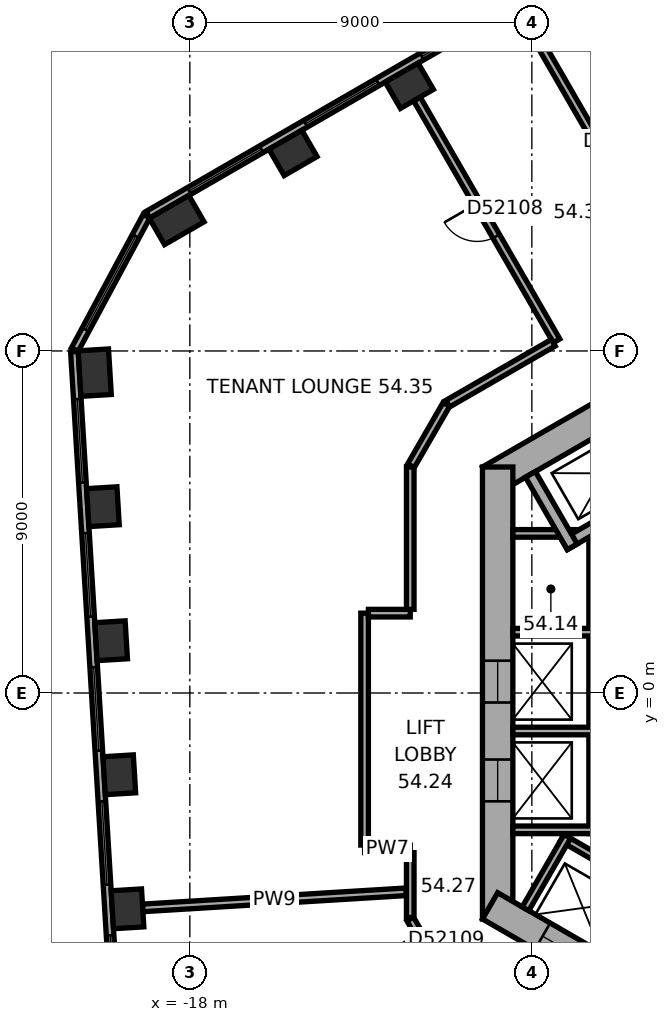
"""IFC4 building model, lengths in metres.
Left out: names, types, materials, properties, quantities, classifications, styles, units other than length and angle.
Written with IfcOpenShell. Run it as: python <this file> out.ifc"""

import sys

from ifc_helpers import new_model, si_unit, direction, frame, frame_2d, origin, origin_2d, place, context, subcontext, project, spatial, rectangle, extrude, element, fill, save


model = new_model("IFC4")
c1 = context("Model", 3, precision=1e-05, world=origin(), true_north=direction((0.0, 1.0)))
c2 = subcontext(c1, "Body", "Model", "MODEL_VIEW")
j1 = project(units=[si_unit("LENGTHUNIT", "METRE"), si_unit("PLANEANGLEUNIT", "RADIAN")], contexts=[c1])
p1 = place(None, origin())
s1 = spatial("IfcSite", under=j1, at=p1, CompositionType="ELEMENT")
p2 = place(p1, origin())
s2 = spatial("IfcBuilding", under=s1, at=p2, CompositionType="ELEMENT")
p3 = place(p2, frame((0.0, 0.0, 221.7)))
s3 = spatial("IfcBuildingStorey", under=s2, at=p3, CompositionType="ELEMENT", Elevation=221.7)
for number, where, z_axis, x_axis in (
    (1, (-12.225, 15.978, 0.0), (0.0, 0.0, 1.0), (-0.866, -0.5, 0.0)),
    (2, (-15.285, 14.211, 0.0), (0.0, 0.0, 1.0), (-0.866, -0.5, 0.0)),
):
    element("IfcColumn", number, at=place(p3, frame(where, z_axis=z_axis, x_axis=x_axis)), inside=s3, PredefinedType="COLUMN", context=c2, shape_type="SweptSolid", body=[
        extrude(rectangle(XDim=1.0, YDim=0.8, at=origin_2d()), origin(), (0.0, 0.0, 1.0), 3.7),
    ])
for number, where, z_axis, x_axis in (
    (3, (-18.345, 12.445, 0.0), (0.0, 0.0, 1.0), (-0.866, -0.5, 0.0)),
    (4, (-20.503, 8.429, 0.0), (0.0, 0.0, 1.0), (0.061, -0.998, 0.0)),
):
    element("IfcColumn", number, at=place(p3, frame(where, z_axis=z_axis, x_axis=x_axis)), inside=s3, PredefinedType="COLUMN", context=c2, shape_type="SweptSolid", body=[
        extrude(rectangle(XDim=1.2, YDim=0.8, at=origin_2d()), origin(), (0.0, 0.0, 1.0), 3.7),
    ])
for number, where, z_axis, x_axis in (
    (5, (-20.287, 4.902, 0.0), (0.0, 0.0, 1.0), (0.061, -0.998, 0.0)),
    (6, (-20.071, 1.375, 0.0), (0.0, 0.0, 1.0), (0.061, -0.998, 0.0)),
    (7, (-19.856, -2.152, 0.0), (0.0, 0.0, 1.0), (0.061, -0.998, 0.0)),
    (8, (-19.64, -5.679, 0.0), (0.0, 0.0, 1.0), (0.061, -0.998, 0.0)),
):
    element("IfcColumn", number, at=place(p3, frame(where, z_axis=z_axis, x_axis=x_axis)), inside=s3, PredefinedType="COLUMN", context=c2, shape_type="SweptSolid", body=[
        extrude(rectangle(XDim=1.0, YDim=0.8, at=origin_2d()), origin(), (0.0, 0.0, 1.0), 3.7),
    ])
p4 = place(p3, frame((0.2, 11.547, 0.0), z_axis=(0.0, 0.0, 1.0), x_axis=(-0.866023897231, -0.500002609418, 0.0)))
e9 = element("IfcWall", 9, at=p4, inside=s3, PredefinedType="SHEAR", context=c2, shape_type="SweptSolid", body=[
    extrude(rectangle(XDim=11.894, YDim=0.8, at=frame_2d((5.947, 0.0))), origin(), (0.0, 0.0, 1.0), 3.7),
])
p5 = place(p4, frame((6.147, 0.0, 0.0)))
e10 = element("IfcOpeningElement", 10, at=p5, cuts=e9, PredefinedType="OPENING", context=c2, shape_type="SweptSolid", body=[
    extrude(rectangle(XDim=1.5, YDim=2.1, at=frame_2d((0.75, 1.05))), frame((0.0, 0.41, 0.0), z_axis=(0.0, -1.0, 0.0), x_axis=(1.0, 0.0, 0.0)), (0.0, 0.0, 1.0), 0.82),
])
p6 = place(p4, frame((2.997, 0.0, 0.0)))
e11 = element("IfcOpeningElement", 11, at=p6, cuts=e9, PredefinedType="OPENING", context=c2, shape_type="SweptSolid", body=[
    extrude(rectangle(XDim=0.9, YDim=2.1, at=frame_2d((0.45, 1.05))), frame((0.0, 0.41, 0.0), z_axis=(0.0, -1.0, 0.0), x_axis=(1.0, 0.0, 0.0)), (0.0, 0.0, 1.0), 0.82),
])
p7 = place(p3, frame((-9.9, 5.947, 0.0), z_axis=(0.0, 0.0, 1.0), x_axis=(0.0, -1.0, 0.0)))
e12 = element("IfcWall", 12, at=p7, inside=s3, PredefinedType="SHEAR", context=c2, shape_type="SweptSolid", body=[
    extrude(rectangle(XDim=11.894, YDim=0.8, at=frame_2d((5.947, 0.0))), origin(), (0.0, 0.0, 1.0), 3.7),
])
p8 = place(p7, frame((5.097, 0.0, 0.0)))
e13 = element("IfcOpeningElement", 13, at=p8, cuts=e12, PredefinedType="OPENING", context=c2, shape_type="SweptSolid", body=[
    extrude(rectangle(XDim=1.1, YDim=2.1, at=frame_2d((0.55, 1.05))), frame((0.0, 0.41, 0.0), z_axis=(0.0, -1.0, 0.0), x_axis=(1.0, 0.0, 0.0)), (0.0, 0.0, 1.0), 0.82),
])
p9 = place(p7, frame((7.697, 0.0, 0.0)))
e14 = element("IfcOpeningElement", 14, at=p9, cuts=e12, PredefinedType="OPENING", context=c2, shape_type="SweptSolid", body=[
    extrude(rectangle(XDim=1.1, YDim=2.1, at=frame_2d((0.55, 1.05))), frame((0.0, 0.41, 0.0), z_axis=(0.0, -1.0, 0.0), x_axis=(1.0, 0.0, 0.0)), (0.0, 0.0, 1.0), 0.82),
])
p10 = place(p3, frame((-10.1, -5.6, 0.0), z_axis=(0.0, 0.0, 1.0), x_axis=(0.866023897231, -0.500002609418, 0.0)))
e15 = element("IfcWall", 15, at=p10, inside=s3, PredefinedType="SHEAR", context=c2, shape_type="SweptSolid", body=[
    extrude(rectangle(XDim=11.894, YDim=0.8, at=frame_2d((5.947, 0.0))), origin(), (0.0, 0.0, 1.0), 3.7),
])
p11 = place(p10, frame((6.147, 0.0, 0.0)))
e16 = element("IfcOpeningElement", 16, at=p11, cuts=e15, PredefinedType="OPENING", context=c2, shape_type="SweptSolid", body=[
    extrude(rectangle(XDim=1.5, YDim=2.1, at=frame_2d((0.75, 1.05))), frame((0.0, 0.41, 0.0), z_axis=(0.0, -1.0, 0.0), x_axis=(1.0, 0.0, 0.0)), (0.0, 0.0, 1.0), 0.82),
])
p12 = place(p10, frame((1.597, 0.0, 0.0)))
e17 = element("IfcOpeningElement", 17, at=p12, cuts=e15, PredefinedType="OPENING", context=c2, shape_type="SweptSolid", body=[
    extrude(rectangle(XDim=1.1, YDim=2.1, at=frame_2d((0.55, 1.05))), frame((0.0, 0.41, 0.0), z_axis=(0.0, -1.0, 0.0), x_axis=(1.0, 0.0, 0.0)), (0.0, 0.0, 1.0), 0.82),
])
p13 = place(p10, frame((4.197, 0.0, 0.0)))
e18 = element("IfcOpeningElement", 18, at=p13, cuts=e15, PredefinedType="OPENING", context=c2, shape_type="SweptSolid", body=[
    extrude(rectangle(XDim=1.1, YDim=2.1, at=frame_2d((0.55, 1.05))), frame((0.0, 0.41, 0.0), z_axis=(0.0, -1.0, 0.0), x_axis=(1.0, 0.0, 0.0)), (0.0, 0.0, 1.0), 0.82),
])
p14 = place(p3, frame((-2.786, 22.005, 0.0), z_axis=(0.0, 0.0, 1.0), x_axis=(-0.866026555358, -0.49999800541, 0.0)))
e19 = element("IfcWall", 19, at=p14, inside=s3, PredefinedType="STANDARD", context=c2, shape_type="SweptSolid", body=[
    extrude(rectangle(XDim=18.841, YDim=0.2, at=frame_2d((9.421, 0.0))), origin(), (0.0, 0.0, 1.0), 3.7),
])
p15 = place(p14, frame((1.254, 0.0, 0.9)))
e20 = element("IfcOpeningElement", 20, at=p15, cuts=e19, PredefinedType="OPENING", context=c2, shape_type="SweptSolid", body=[
    extrude(rectangle(XDim=2.2, YDim=2.0, at=frame_2d((1.1, 1.0))), frame((0.0, 0.11, 0.0), z_axis=(0.0, -1.0, 0.0), x_axis=(1.0, 0.0, 0.0)), (0.0, 0.0, 1.0), 0.22),
])
p16 = place(p14, frame((4.788, 0.0, 0.9)))
e21 = element("IfcOpeningElement", 21, at=p16, cuts=e19, PredefinedType="OPENING", context=c2, shape_type="SweptSolid", body=[
    extrude(rectangle(XDim=2.2, YDim=2.0, at=frame_2d((1.1, 1.0))), frame((0.0, 0.11, 0.0), z_axis=(0.0, -1.0, 0.0), x_axis=(1.0, 0.0, 0.0)), (0.0, 0.0, 1.0), 0.22),
])
p17 = place(p14, frame((8.321, 0.0, 0.9)))
e22 = element("IfcOpeningElement", 22, at=p17, cuts=e19, PredefinedType="OPENING", context=c2, shape_type="SweptSolid", body=[
    extrude(rectangle(XDim=2.2, YDim=2.0, at=frame_2d((1.1, 1.0))), frame((0.0, 0.11, 0.0), z_axis=(0.0, -1.0, 0.0), x_axis=(1.0, 0.0, 0.0)), (0.0, 0.0, 1.0), 0.22),
])
p18 = place(p14, frame((11.855, 0.0, 0.9)))
e23 = element("IfcOpeningElement", 23, at=p18, cuts=e19, PredefinedType="OPENING", context=c2, shape_type="SweptSolid", body=[
    extrude(rectangle(XDim=2.2, YDim=2.0, at=frame_2d((1.1, 1.0))), frame((0.0, 0.11, 0.0), z_axis=(0.0, -1.0, 0.0), x_axis=(1.0, 0.0, 0.0)), (0.0, 0.0, 1.0), 0.22),
])
p19 = place(p14, frame((15.389, 0.0, 0.9)))
e24 = element("IfcOpeningElement", 24, at=p19, cuts=e19, PredefinedType="OPENING", context=c2, shape_type="SweptSolid", body=[
    extrude(rectangle(XDim=2.2, YDim=2.0, at=frame_2d((1.1, 1.0))), frame((0.0, 0.11, 0.0), z_axis=(0.0, -1.0, 0.0), x_axis=(1.0, 0.0, 0.0)), (0.0, 0.0, 1.0), 0.22),
])
p20 = place(p3, frame((-19.141, 12.545, 0.0), z_axis=(0.0, 0.0, 1.0), x_axis=(-0.473306370921, -0.880897882416, 0.0)))
e25 = element("IfcWall", 25, at=p20, inside=s3, PredefinedType="STANDARD", context=c2, shape_type="SweptSolid", body=[
    extrude(rectangle(XDim=3.983, YDim=0.2, at=frame_2d((1.991, 0.0))), origin(), (0.0, 0.0, 1.0), 3.7),
])
p21 = place(p20, frame((0.591, 0.0, 0.9)))
e26 = element("IfcOpeningElement", 26, at=p21, cuts=e25, PredefinedType="OPENING", context=c2, shape_type="SweptSolid", body=[
    extrude(rectangle(XDim=2.8, YDim=2.0, at=frame_2d((1.4, 1.0))), frame((0.0, 0.11, 0.0), z_axis=(0.0, -1.0, 0.0), x_axis=(1.0, 0.0, 0.0)), (0.0, 0.0, 1.0), 0.22),
])
p22 = place(p3, frame((-21.038, 8.984, 0.0), z_axis=(0.0, 0.0, 1.0), x_axis=(0.061043935634, -0.998135079998, 0.0)))
e27 = element("IfcWall", 27, at=p22, inside=s3, PredefinedType="STANDARD", context=c2, shape_type="SweptSolid", body=[
    extrude(rectangle(XDim=18.841, YDim=0.2, at=frame_2d((9.421, 0.0))), origin(), (0.0, 0.0, 1.0), 3.7),
])
p23 = place(p22, frame((1.253, 0.0, 0.9)))
e28 = element("IfcOpeningElement", 28, at=p23, cuts=e27, PredefinedType="OPENING", context=c2, shape_type="SweptSolid", body=[
    extrude(rectangle(XDim=2.2, YDim=2.0, at=frame_2d((1.1, 1.0))), frame((0.0, 0.11, 0.0), z_axis=(0.0, -1.0, 0.0), x_axis=(1.0, 0.0, 0.0)), (0.0, 0.0, 1.0), 0.22),
])
p24 = place(p22, frame((4.786, 0.0, 0.9)))
e29 = element("IfcOpeningElement", 29, at=p24, cuts=e27, PredefinedType="OPENING", context=c2, shape_type="SweptSolid", body=[
    extrude(rectangle(XDim=2.2, YDim=2.0, at=frame_2d((1.1, 1.0))), frame((0.0, 0.11, 0.0), z_axis=(0.0, -1.0, 0.0), x_axis=(1.0, 0.0, 0.0)), (0.0, 0.0, 1.0), 0.22),
])
p25 = place(p22, frame((8.32, 0.0, 0.9)))
e30 = element("IfcOpeningElement", 30, at=p25, cuts=e27, PredefinedType="OPENING", context=c2, shape_type="SweptSolid", body=[
    extrude(rectangle(XDim=2.2, YDim=2.0, at=frame_2d((1.1, 1.0))), frame((0.0, 0.11, 0.0), z_axis=(0.0, -1.0, 0.0), x_axis=(1.0, 0.0, 0.0)), (0.0, 0.0, 1.0), 0.22),
])
p26 = place(p22, frame((11.854, 0.0, 0.9)))
e31 = element("IfcOpeningElement", 31, at=p26, cuts=e27, PredefinedType="OPENING", context=c2, shape_type="SweptSolid", body=[
    extrude(rectangle(XDim=2.2, YDim=2.0, at=frame_2d((1.1, 1.0))), frame((0.0, 0.11, 0.0), z_axis=(0.0, -1.0, 0.0), x_axis=(1.0, 0.0, 0.0)), (0.0, 0.0, 1.0), 0.22),
])
p27 = place(p22, frame((15.387, 0.0, 0.9)))
e32 = element("IfcOpeningElement", 32, at=p27, cuts=e27, PredefinedType="OPENING", context=c2, shape_type="SweptSolid", body=[
    extrude(rectangle(XDim=2.2, YDim=2.0, at=frame_2d((1.1, 1.0))), frame((0.0, 0.11, 0.0), z_axis=(0.0, -1.0, 0.0), x_axis=(1.0, 0.0, 0.0)), (0.0, 0.0, 1.0), 0.22),
])
p28 = place(p3, frame((-7.4, 4.3, 0.0), z_axis=(0.0, 0.0, 1.0), x_axis=(0.0, -1.0, 0.0)))
e33 = element("IfcWall", 33, at=p28, inside=s3, PredefinedType="PARTITIONING", context=c2, shape_type="SweptSolid", body=[
    extrude(rectangle(XDim=8.0, YDim=0.2, at=frame_2d((4.0, 0.0))), origin(), (0.0, 0.0, 1.0), 3.42),
])
for number, where, z_axis, x_axis in (
    (34, (-7.3, 4.2, 0.0), (0.0, 0.0, 1.0), (-1.0, 0.0, 0.0)),
    (35, (-7.3, 1.6, 0.0), (0.0, 0.0, 1.0), (-1.0, 0.0, 0.0)),
    (36, (-7.3, -1.0, 0.0), (0.0, 0.0, 1.0), (-1.0, 0.0, 0.0)),
    (37, (-7.3, -3.6, 0.0), (0.0, 0.0, 1.0), (-1.0, 0.0, 0.0)),
):
    element("IfcWall", number, at=place(p3, frame(where, z_axis=z_axis, x_axis=x_axis)), inside=s3, PredefinedType="PARTITIONING", context=c2, shape_type="SweptSolid", body=[
        extrude(rectangle(XDim=2.2, YDim=0.2, at=frame_2d((1.1, 0.0))), origin(), (0.0, 0.0, 1.0), 3.42),
    ])
p29 = place(p3, frame((-8.203, -3.809, 0.0), z_axis=(0.0, 0.0, 1.0), x_axis=(0.866028230842, -0.499995103361, 0.0)))
e38 = element("IfcWall", 38, at=p29, inside=s3, PredefinedType="PARTITIONING", context=c2, shape_type="SweptSolid", body=[
    extrude(rectangle(XDim=5.4, YDim=0.2, at=frame_2d((2.7, 0.0))), origin(), (0.0, 0.0, 1.0), 3.42),
])
p30 = place(p3, frame((-8.067, -3.772, 0.0), z_axis=(0.0, 0.0, 1.0), x_axis=(-0.50002983664, -0.866008176907, 0.0)))
e39 = element("IfcWall", 39, at=p30, inside=s3, PredefinedType="PARTITIONING", context=c2, shape_type="SweptSolid", body=[
    extrude(rectangle(XDim=2.2, YDim=0.2, at=frame_2d((1.1, 0.0))), origin(), (0.0, 0.0, 1.0), 3.42),
])
p31 = place(p3, frame((-5.24, 5.577, 0.0), z_axis=(0.0, 0.0, 1.0), x_axis=(-0.866014461049, -0.500018952895, 0.0)))
e40 = element("IfcWall", 40, at=p31, inside=s3, PredefinedType="SHEAR", context=c2, shape_type="SweptSolid", body=[
    extrude(rectangle(XDim=3.35, YDim=0.3, at=frame_2d((1.675, 0.0))), origin(), (0.0, 0.0, 1.0), 3.42),
])
p32 = place(p3, frame((-7.937, 3.847, 0.0), z_axis=(0.0, 0.0, 1.0), x_axis=(-0.50002983664, 0.866008176907, 0.0)))
e41 = element("IfcWall", 41, at=p32, inside=s3, PredefinedType="SHEAR", context=c2, shape_type="SweptSolid", body=[
    extrude(rectangle(XDim=2.2, YDim=0.3, at=frame_2d((1.1, 0.0))), origin(), (0.0, 0.0, 1.0), 3.42),
])
p33 = place(p3, frame((-19.241, -5.654, 0.0), z_axis=(0.0, 0.0, 1.0), x_axis=(0.998135538818, 0.061036432963, 0.0)))
e42 = element("IfcWall", 42, at=p33, inside=s3, PredefinedType="PARTITIONING", context=c2, shape_type="SweptSolid", body=[
    extrude(rectangle(XDim=6.944, YDim=0.2, at=frame_2d((3.472, 0.0))), origin(), (0.0, 0.0, 1.0), 2.87),
])
p34 = place(p3, frame((-13.401, -4.101, 0.0), z_axis=(0.0, 0.0, 1.0), x_axis=(1.0, 0.0, 0.0)))
e43 = element("IfcWall", 43, at=p34, inside=s3, PredefinedType="PARTITIONING", context=c2, shape_type="SweptSolid", body=[
    extrude(rectangle(XDim=1.201, YDim=0.2, at=frame_2d((0.601, 0.0))), origin(), (0.0, 0.0, 1.0), 3.42),
])
p35 = place(p3, frame((-13.401, 2.101, 0.0), z_axis=(0.0, 0.0, 1.0), x_axis=(0.0, -1.0, 0.0)))
e44 = element("IfcWall", 44, at=p35, inside=s3, PredefinedType="PARTITIONING", context=c2, shape_type="SweptSolid", body=[
    extrude(rectangle(XDim=6.102, YDim=0.2, at=frame_2d((3.051, 0.0))), origin(), (0.0, 0.0, 1.0), 3.42),
])
p36 = place(p3, frame((-12.2, -5.947, 0.0), z_axis=(0.0, 0.0, 1.0), x_axis=(0.500022797313, -0.86601224135, 0.0)))
e45 = element("IfcWall", 45, at=p36, inside=s3, PredefinedType="PARTITIONING", context=c2, shape_type="SweptSolid", body=[
    extrude(rectangle(XDim=1.9, YDim=0.2, at=frame_2d((0.95, 0.0))), origin(), (0.0, 0.0, 1.0), 3.42),
])
p37 = place(p36, frame((0.45, 0.0, 0.0)))
e46 = element("IfcOpeningElement", 46, at=p37, cuts=e45, PredefinedType="OPENING", context=c2, shape_type="SweptSolid", body=[
    extrude(rectangle(XDim=1.0, YDim=2.1, at=frame_2d((0.5, 1.05))), frame((0.0, 0.11, 0.0), z_axis=(0.0, -1.0, 0.0), x_axis=(1.0, 0.0, 0.0)), (0.0, 0.0, 1.0), 0.22),
])
p38 = place(p3, frame((-12.2, -4.201, 0.0), z_axis=(0.0, 0.0, 1.0), x_axis=(0.0, -1.0, 0.0)))
e47 = element("IfcWall", 47, at=p38, inside=s3, PredefinedType="PARTITIONING", context=c2, shape_type="SweptSolid", body=[
    extrude(rectangle(XDim=1.706, YDim=0.2, at=frame_2d((0.853, 0.0))), origin(), (0.0, 0.0, 1.0), 3.42),
])
p39 = place(p3, frame((-12.2, 2.101, 0.0), z_axis=(0.0, 0.0, 1.0), x_axis=(-1.0, 0.0, 0.0)))
e48 = element("IfcWall", 48, at=p39, inside=s3, PredefinedType="PARTITIONING", context=c2, shape_type="SweptSolid", body=[
    extrude(rectangle(XDim=1.101, YDim=0.2, at=frame_2d((0.551, 0.0))), origin(), (0.0, 0.0, 1.0), 3.42),
])
p40 = place(p3, frame((-12.2, 5.947, 0.0), z_axis=(0.0, 0.0, 1.0), x_axis=(0.0, -1.0, 0.0)))
e49 = element("IfcWall", 49, at=p40, inside=s3, PredefinedType="PARTITIONING", context=c2, shape_type="SweptSolid", body=[
    extrude(rectangle(XDim=3.746, YDim=0.2, at=frame_2d((1.873, 0.0))), origin(), (0.0, 0.0, 1.0), 3.42),
])
p41 = place(p3, frame((-12.025, 15.632, 0.0), z_axis=(0.0, 0.0, 1.0), x_axis=(0.499983153418, -0.866035129944, 0.0)))
e50 = element("IfcWall", 50, at=p41, inside=s3, PredefinedType="PARTITIONING", context=c2, shape_type="SweptSolid", body=[
    extrude(rectangle(XDim=7.35, YDim=0.2, at=frame_2d((3.675, 0.0))), origin(), (0.0, 0.0, 1.0), 3.42),
])
p42 = place(p41, frame((3.175, 0.0, 0.0)))
e51 = element("IfcOpeningElement", 51, at=p42, cuts=e50, PredefinedType="OPENING", context=c2, shape_type="SweptSolid", body=[
    extrude(rectangle(XDim=1.0, YDim=2.1, at=frame_2d((0.5, 1.05))), frame((0.0, 0.11, 0.0), z_axis=(0.0, -1.0, 0.0), x_axis=(1.0, 0.0, 0.0)), (0.0, 0.0, 1.0), 0.22),
])
p43 = place(p3, frame((-11.25, 7.592, 0.0), z_axis=(0.0, 0.0, 1.0), x_axis=(-0.499964847546, -0.866045698112, 0.0)))
e52 = element("IfcWall", 52, at=p43, inside=s3, PredefinedType="PARTITIONING", context=c2, shape_type="SweptSolid", body=[
    extrude(rectangle(XDim=1.86, YDim=0.2, at=frame_2d((0.93, 0.0))), origin(), (0.0, 0.0, 1.0), 3.42),
])
p44 = place(p3, frame((-8.965, 17.399, 0.0), z_axis=(0.0, 0.0, 1.0), x_axis=(0.499993683172, -0.866029050776, 0.0)))
e53 = element("IfcWall", 53, at=p44, inside=s3, PredefinedType="PARTITIONING", context=c2, shape_type="SweptSolid", body=[
    extrude(rectangle(XDim=7.35, YDim=0.2, at=frame_2d((3.675, 0.0))), origin(), (0.0, 0.0, 1.0), 2.87),
])
p45 = place(p44, frame((3.175, 0.0, 0.0)))
e54 = element("IfcOpeningElement", 54, at=p45, cuts=e53, PredefinedType="OPENING", context=c2, shape_type="SweptSolid", body=[
    extrude(rectangle(XDim=1.0, YDim=2.1, at=frame_2d((0.5, 1.05))), frame((0.0, 0.11, 0.0), z_axis=(0.0, -1.0, 0.0), x_axis=(1.0, 0.0, 0.0)), (0.0, 0.0, 1.0), 0.22),
])
p46 = place(p3, frame((-8.437, 9.217, 0.0), z_axis=(0.0, 0.0, 1.0), x_axis=(-0.866005660673, -0.500034194513, 0.0)))
e55 = element("IfcWall", 55, at=p46, inside=s3, PredefinedType="PARTITIONING", context=c2, shape_type="SweptSolid", body=[
    extrude(rectangle(XDim=3.209, YDim=0.2, at=frame_2d((1.604, 0.0))), origin(), (0.0, 0.0, 1.0), 3.42),
])
p47 = place(p17, origin())
e56 = element("IfcWindow", 56, at=p47, inside=s3, PartitioningType="SINGLE_PANEL", PredefinedType="WINDOW", context=c2, shape_type="SweptSolid", body=[
    extrude(rectangle(XDim=2.2, YDim=2.0, at=frame_2d((1.1, 1.0))), frame((0.0, 0.03, 0.0), z_axis=(0.0, -1.0, 0.0), x_axis=(1.0, 0.0, 0.0)), (0.0, 0.0, 1.0), 0.06),
])
fill(e22, e56)
p48 = place(p18, origin())
e57 = element("IfcWindow", 57, at=p48, inside=s3, PartitioningType="SINGLE_PANEL", PredefinedType="WINDOW", context=c2, shape_type="SweptSolid", body=[
    extrude(rectangle(XDim=2.2, YDim=2.0, at=frame_2d((1.1, 1.0))), frame((0.0, 0.03, 0.0), z_axis=(0.0, -1.0, 0.0), x_axis=(1.0, 0.0, 0.0)), (0.0, 0.0, 1.0), 0.06),
])
fill(e23, e57)
p49 = place(p19, origin())
e58 = element("IfcWindow", 58, at=p49, inside=s3, PartitioningType="SINGLE_PANEL", PredefinedType="WINDOW", context=c2, shape_type="SweptSolid", body=[
    extrude(rectangle(XDim=2.2, YDim=2.0, at=frame_2d((1.1, 1.0))), frame((0.0, 0.03, 0.0), z_axis=(0.0, -1.0, 0.0), x_axis=(1.0, 0.0, 0.0)), (0.0, 0.0, 1.0), 0.06),
])
fill(e24, e58)
p50 = place(p21, origin())
e59 = element("IfcWindow", 59, at=p50, inside=s3, PartitioningType="SINGLE_PANEL", PredefinedType="WINDOW", context=c2, shape_type="SweptSolid", body=[
    extrude(rectangle(XDim=2.8, YDim=2.0, at=frame_2d((1.4, 1.0))), frame((0.0, 0.03, 0.0), z_axis=(0.0, -1.0, 0.0), x_axis=(1.0, 0.0, 0.0)), (0.0, 0.0, 1.0), 0.06),
])
fill(e26, e59)
p51 = place(p23, origin())
e60 = element("IfcWindow", 60, at=p51, inside=s3, PartitioningType="SINGLE_PANEL", PredefinedType="WINDOW", context=c2, shape_type="SweptSolid", body=[
    extrude(rectangle(XDim=2.2, YDim=2.0, at=frame_2d((1.1, 1.0))), frame((0.0, 0.03, 0.0), z_axis=(0.0, -1.0, 0.0), x_axis=(1.0, 0.0, 0.0)), (0.0, 0.0, 1.0), 0.06),
])
fill(e28, e60)
p52 = place(p24, origin())
e61 = element("IfcWindow", 61, at=p52, inside=s3, PartitioningType="SINGLE_PANEL", PredefinedType="WINDOW", context=c2, shape_type="SweptSolid", body=[
    extrude(rectangle(XDim=2.2, YDim=2.0, at=frame_2d((1.1, 1.0))), frame((0.0, 0.03, 0.0), z_axis=(0.0, -1.0, 0.0), x_axis=(1.0, 0.0, 0.0)), (0.0, 0.0, 1.0), 0.06),
])
fill(e29, e61)
p53 = place(p25, origin())
e62 = element("IfcWindow", 62, at=p53, inside=s3, PartitioningType="SINGLE_PANEL", PredefinedType="WINDOW", context=c2, shape_type="SweptSolid", body=[
    extrude(rectangle(XDim=2.2, YDim=2.0, at=frame_2d((1.1, 1.0))), frame((0.0, 0.03, 0.0), z_axis=(0.0, -1.0, 0.0), x_axis=(1.0, 0.0, 0.0)), (0.0, 0.0, 1.0), 0.06),
])
fill(e30, e62)
p54 = place(p26, origin())
e63 = element("IfcWindow", 63, at=p54, inside=s3, PartitioningType="SINGLE_PANEL", PredefinedType="WINDOW", context=c2, shape_type="SweptSolid", body=[
    extrude(rectangle(XDim=2.2, YDim=2.0, at=frame_2d((1.1, 1.0))), frame((0.0, 0.03, 0.0), z_axis=(0.0, -1.0, 0.0), x_axis=(1.0, 0.0, 0.0)), (0.0, 0.0, 1.0), 0.06),
])
fill(e31, e63)
p55 = place(p27, origin())
e64 = element("IfcWindow", 64, at=p55, inside=s3, PartitioningType="SINGLE_PANEL", PredefinedType="WINDOW", context=c2, shape_type="SweptSolid", body=[
    extrude(rectangle(XDim=2.2, YDim=2.0, at=frame_2d((1.1, 1.0))), frame((0.0, 0.03, 0.0), z_axis=(0.0, -1.0, 0.0), x_axis=(1.0, 0.0, 0.0)), (0.0, 0.0, 1.0), 0.06),
])
fill(e32, e64)
p56 = place(p8, origin())
e65 = element("IfcDoor", 65, at=p56, inside=s3, OperationType="DOUBLE_DOOR_SLIDING", PredefinedType="DOOR", context=c2, shape_type="SweptSolid", body=[
    extrude(rectangle(XDim=1.1, YDim=2.1, at=frame_2d((0.55, 1.05))), frame((0.0, 0.025, 0.0), z_axis=(0.0, -1.0, 0.0), x_axis=(1.0, 0.0, 0.0)), (0.0, 0.0, 1.0), 0.05),
])
fill(e13, e65)
p57 = place(p9, origin())
e66 = element("IfcDoor", 66, at=p57, inside=s3, OperationType="DOUBLE_DOOR_SLIDING", PredefinedType="DOOR", context=c2, shape_type="SweptSolid", body=[
    extrude(rectangle(XDim=1.1, YDim=2.1, at=frame_2d((0.55, 1.05))), frame((0.0, 0.025, 0.0), z_axis=(0.0, -1.0, 0.0), x_axis=(1.0, 0.0, 0.0)), (0.0, 0.0, 1.0), 0.05),
])
fill(e14, e66)
p58 = place(p12, origin())
e67 = element("IfcDoor", 67, at=p58, inside=s3, OperationType="DOUBLE_DOOR_SLIDING", PredefinedType="DOOR", context=c2, shape_type="SweptSolid", body=[
    extrude(rectangle(XDim=1.1, YDim=2.1, at=frame_2d((0.55, 1.05))), frame((0.0, 0.025, 0.0), z_axis=(0.0, -1.0, 0.0), x_axis=(1.0, 0.0, 0.0)), (0.0, 0.0, 1.0), 0.05),
])
fill(e17, e67)
p59 = place(p42, origin())
e68 = element("IfcDoor", 68, at=p59, inside=s3, OperationType="SINGLE_SWING_LEFT", PredefinedType="DOOR", context=c2, shape_type="SweptSolid", body=[
    extrude(rectangle(XDim=1.0, YDim=2.1, at=frame_2d((0.5, 1.05))), frame((0.0, 0.025, 0.0), z_axis=(0.0, -1.0, 0.0), x_axis=(1.0, 0.0, 0.0)), (0.0, 0.0, 1.0), 0.05),
])
fill(e51, e68)
p60 = place(p37, origin())
e69 = element("IfcDoor", 69, at=p60, inside=s3, OperationType="SINGLE_SWING_LEFT", PredefinedType="DOOR", context=c2, shape_type="SweptSolid", body=[
    extrude(rectangle(XDim=1.0, YDim=2.1, at=frame_2d((0.5, 1.05))), frame((0.0, 0.025, 0.0), z_axis=(0.0, -1.0, 0.0), x_axis=(1.0, 0.0, 0.0)), (0.0, 0.0, 1.0), 0.05),
])
fill(e46, e69)
save(model, sys.argv[1])
